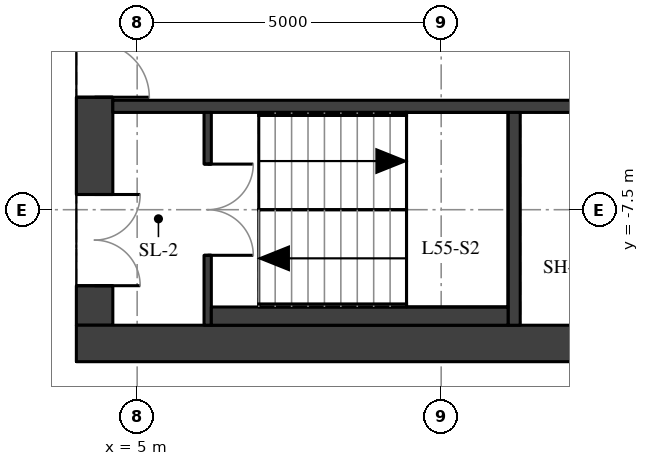
"""IFC4 building model, lengths in metres.
Left out: names, types, materials, properties, quantities, classifications, styles, units other than length and angle.
Written with IfcOpenShell. Run it as: python <this file> out.ifc"""

import sys

from ifc_helpers import new_model, si_unit, direction, frame, frame_2d, origin, place, context, subcontext, project, spatial, rectangle, extrude, element, fill, save


model = new_model("IFC4")
c1 = context("Model", 3, precision=1e-05, world=origin(), true_north=direction((0.0, 1.0)))
c2 = subcontext(c1, "Body", "Model", "MODEL_VIEW")
j1 = project(units=[si_unit("LENGTHUNIT", "METRE"), si_unit("PLANEANGLEUNIT", "RADIAN")], contexts=[c1])
p1 = place(None, origin())
s1 = spatial("IfcSite", under=j1, at=p1, CompositionType="ELEMENT")
p2 = place(p1, origin())
s2 = spatial("IfcBuilding", under=s1, at=p2, CompositionType="ELEMENT")
p3 = place(p2, frame((0.0, 0.0, 195.8)))
s3 = spatial("IfcBuildingStorey", under=s2, at=p3, CompositionType="ELEMENT", Elevation=195.8)
p4 = place(p3, frame((4.3, -9.4, 0.0), z_axis=(0.0, 0.0, 1.0), x_axis=(0.0, 1.0, 0.0)))
e1 = element("IfcWall", 1, at=p4, inside=s3, PredefinedType="SHEAR", context=c2, shape_type="SweptSolid", body=[
    extrude(rectangle(XDim=18.8, YDim=0.6, at=frame_2d((9.4, 0.0))), origin(), (0.0, 0.0, 1.0), 3.02),
])
p5 = place(p4, frame((0.65, 0.0, 0.0)))
e2 = element("IfcOpeningElement", 2, at=p5, cuts=e1, PredefinedType="OPENING", context=c2, shape_type="SweptSolid", body=[
    extrude(rectangle(XDim=1.5, YDim=2.1, at=frame_2d((0.75, 1.05))), frame((0.0, 0.31, 0.0), z_axis=(0.0, -1.0, 0.0), x_axis=(1.0, 0.0, 0.0)), (0.0, 0.0, 1.0), 0.62),
])
p6 = place(p4, frame((3.75, 0.0, 0.0)))
e3 = element("IfcOpeningElement", 3, at=p6, cuts=e1, PredefinedType="OPENING", context=c2, shape_type="SweptSolid", body=[
    extrude(rectangle(XDim=1.8, YDim=2.1, at=frame_2d((0.9, 1.05))), frame((0.0, 0.31, 0.0), z_axis=(0.0, -1.0, 0.0), x_axis=(1.0, 0.0, 0.0)), (0.0, 0.0, 1.0), 0.62),
])
p7 = place(p4, frame((6.25, 0.0, 0.0)))
e4 = element("IfcOpeningElement", 4, at=p7, cuts=e1, PredefinedType="OPENING", context=c2, shape_type="SweptSolid", body=[
    extrude(rectangle(XDim=1.1, YDim=2.1, at=frame_2d((0.55, 1.05))), frame((0.0, 0.31, 0.0), z_axis=(0.0, -1.0, 0.0), x_axis=(1.0, 0.0, 0.0)), (0.0, 0.0, 1.0), 0.62),
])
p8 = place(p4, frame((8.9, 0.0, 0.0)))
e5 = element("IfcOpeningElement", 5, at=p8, cuts=e1, PredefinedType="OPENING", context=c2, shape_type="SweptSolid", body=[
    extrude(rectangle(XDim=1.0, YDim=2.1, at=frame_2d((0.5, 1.05))), frame((0.0, 0.31, 0.0), z_axis=(0.0, -1.0, 0.0), x_axis=(1.0, 0.0, 0.0)), (0.0, 0.0, 1.0), 0.62),
])
p9 = place(p4, frame((11.45, 0.0, 0.0)))
e6 = element("IfcOpeningElement", 6, at=p9, cuts=e1, PredefinedType="OPENING", context=c2, shape_type="SweptSolid", body=[
    extrude(rectangle(XDim=1.1, YDim=2.1, at=frame_2d((0.55, 1.05))), frame((0.0, 0.31, 0.0), z_axis=(0.0, -1.0, 0.0), x_axis=(1.0, 0.0, 0.0)), (0.0, 0.0, 1.0), 0.62),
])
p10 = place(p4, frame((13.25, 0.0, 0.0)))
e7 = element("IfcOpeningElement", 7, at=p10, cuts=e1, PredefinedType="OPENING", context=c2, shape_type="SweptSolid", body=[
    extrude(rectangle(XDim=1.8, YDim=2.1, at=frame_2d((0.9, 1.05))), frame((0.0, 0.31, 0.0), z_axis=(0.0, -1.0, 0.0), x_axis=(1.0, 0.0, 0.0)), (0.0, 0.0, 1.0), 0.62),
])
p11 = place(p4, frame((16.65, 0.0, 0.0)))
e8 = element("IfcOpeningElement", 8, at=p11, cuts=e1, PredefinedType="OPENING", context=c2, shape_type="SweptSolid", body=[
    extrude(rectangle(XDim=1.5, YDim=2.1, at=frame_2d((0.75, 1.05))), frame((0.0, 0.31, 0.0), z_axis=(0.0, -1.0, 0.0), x_axis=(1.0, 0.0, 0.0)), (0.0, 0.0, 1.0), 0.62),
])
p12 = place(p3, frame((4.0, -9.7, 0.0), z_axis=(0.0, 0.0, 1.0), x_axis=(1.0, 0.0, 0.0)))
e9 = element("IfcWall", 9, at=p12, inside=s3, PredefinedType="SHEAR", context=c2, shape_type="SweptSolid", body=[
    extrude(rectangle(XDim=12.0, YDim=0.6, at=frame_2d((6.0, 0.0))), origin(), (0.0, 0.0, 1.0), 3.02),
])
p13 = place(p3, frame((4.6, -5.8, 0.0), z_axis=(0.0, 0.0, 1.0), x_axis=(1.0, 0.0, 0.0)))
e10 = element("IfcWall", 10, at=p13, inside=s3, PredefinedType="SHEAR", context=c2, shape_type="SweptSolid", body=[
    extrude(rectangle(XDim=10.8, YDim=0.2, at=frame_2d((5.4, 0.0))), origin(), (0.0, 0.0, 1.0), 3.02),
])
p14 = place(p3, frame((11.2, -9.4, 0.0), z_axis=(0.0, 0.0, 1.0), x_axis=(0.0, 1.0, 0.0)))
e11 = element("IfcWall", 11, at=p14, inside=s3, PredefinedType="SHEAR", context=c2, shape_type="SweptSolid", body=[
    extrude(rectangle(XDim=3.5, YDim=0.2, at=frame_2d((1.75, 0.0))), origin(), (0.0, 0.0, 1.0), 3.02),
])
p15 = place(p3, frame((6.16, -9.4, 0.0), z_axis=(0.0, 0.0, 1.0), x_axis=(0.0, 1.0, 0.0)))
e12 = element("IfcWall", 12, at=p15, inside=s3, PredefinedType="SHEAR", context=c2, shape_type="SweptSolid", body=[
    extrude(rectangle(XDim=3.5, YDim=0.12, at=frame_2d((1.75, 0.0))), origin(), (0.0, 0.0, 1.0), 3.02),
])
p16 = place(p15, frame((1.15, 0.0, 0.0)))
e13 = element("IfcOpeningElement", 13, at=p16, cuts=e12, PredefinedType="OPENING", context=c2, shape_type="SweptSolid", body=[
    extrude(rectangle(XDim=1.5, YDim=2.1, at=frame_2d((0.75, 1.05))), frame((0.0, 0.07, 0.0), z_axis=(0.0, -1.0, 0.0), x_axis=(1.0, 0.0, 0.0)), (0.0, 0.0, 1.0), 0.14),
])
p17 = place(p3, frame((6.22, -9.25, 0.0), z_axis=(0.0, 0.0, 1.0), x_axis=(1.0, 0.0, 0.0)))
e14 = element("IfcWall", 14, at=p17, inside=s3, PredefinedType="PARTITIONING", context=c2, shape_type="SweptSolid", body=[
    extrude(rectangle(XDim=4.88, YDim=0.3, at=frame_2d((2.44, 0.0))), origin(), (0.0, 0.0, 1.0), 3.02),
])
p18 = place(p5, origin())
e15 = element("IfcDoor", 15, at=p18, inside=s3, OperationType="DOUBLE_DOOR_SINGLE_SWING", PredefinedType="DOOR", context=c2, shape_type="SweptSolid", body=[
    extrude(rectangle(XDim=1.5, YDim=2.1, at=frame_2d((0.75, 1.05))), frame((0.0, 0.025, 0.0), z_axis=(0.0, -1.0, 0.0), x_axis=(1.0, 0.0, 0.0)), (0.0, 0.0, 1.0), 0.05),
])
fill(e2, e15)
p19 = place(p6, origin())
e16 = element("IfcDoor", 16, at=p19, inside=s3, OperationType="DOUBLE_DOOR_SINGLE_SWING", PredefinedType="DOOR", context=c2, shape_type="SweptSolid", body=[
    extrude(rectangle(XDim=1.8, YDim=2.1, at=frame_2d((0.9, 1.05))), frame((0.0, 0.025, 0.0), z_axis=(0.0, -1.0, 0.0), x_axis=(1.0, 0.0, 0.0)), (0.0, 0.0, 1.0), 0.05),
])
fill(e3, e16)
p20 = place(p16, origin())
e17 = element("IfcDoor", 17, at=p20, inside=s3, OperationType="DOUBLE_DOOR_SINGLE_SWING", PredefinedType="DOOR", context=c2, shape_type="SweptSolid", body=[
    extrude(rectangle(XDim=1.5, YDim=2.1, at=frame_2d((0.75, 1.05))), frame((0.0, 0.025, 0.0), z_axis=(0.0, -1.0, 0.0), x_axis=(1.0, 0.0, 0.0)), (0.0, 0.0, 1.0), 0.05),
])
fill(e13, e17)
save(model, sys.argv[1])
